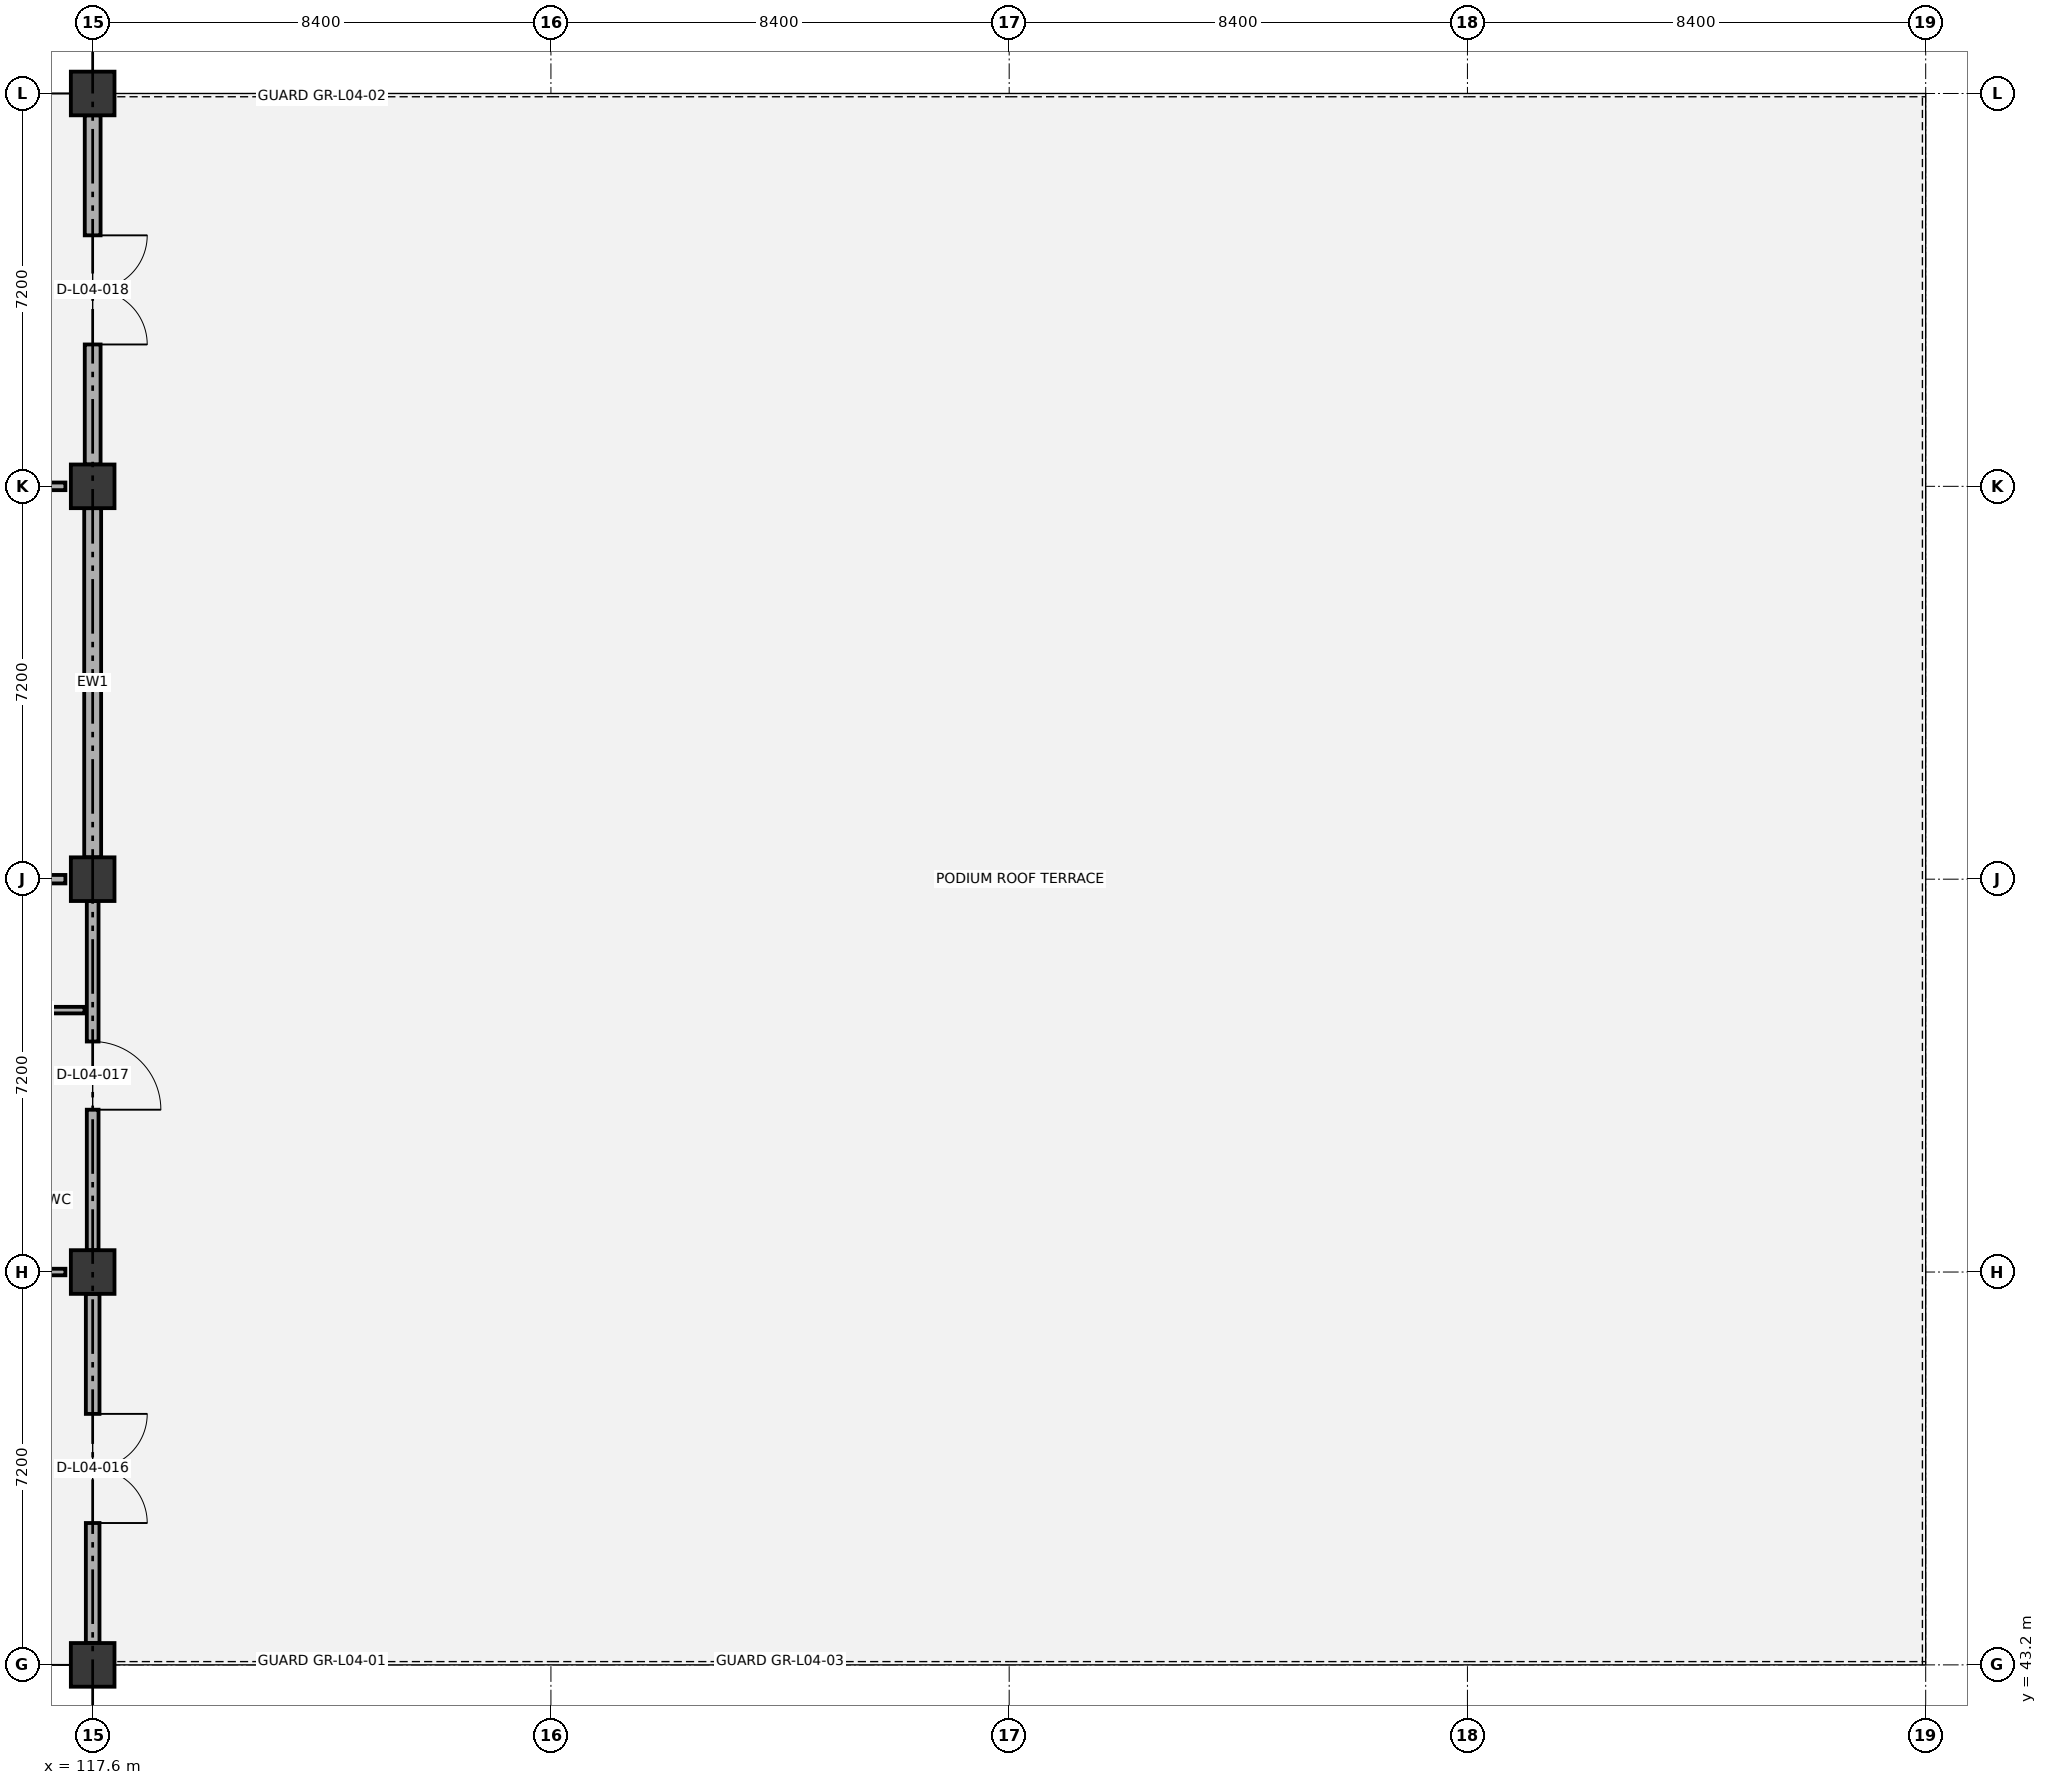
"""IFC4 building model, lengths in metres.
Left out: names, types, materials, properties, quantities, classifications, styles, units other than length and angle.
Written with IfcOpenShell. Run it as: python <this file> out.ifc"""

import sys

from ifc_helpers import new_model, si_unit, direction, frame, frame_2d, origin, origin_2d, place, context, subcontext, project, spatial, rectangle, extrude, element, fill, save


model = new_model("IFC4")
c1 = context("Model", 3, precision=1e-05, world=origin(), true_north=direction((0.0, 1.0)))
c2 = subcontext(c1, "Body", "Model", "MODEL_VIEW")
j1 = project(units=[si_unit("LENGTHUNIT", "METRE"), si_unit("PLANEANGLEUNIT", "RADIAN")], contexts=[c1])
p1 = place(None, origin())
s1 = spatial("IfcSite", under=j1, at=p1, CompositionType="ELEMENT")
p2 = place(p1, origin())
s2 = spatial("IfcBuilding", under=s1, at=p2, CompositionType="ELEMENT")
p3 = place(p2, frame((0.0, 0.0, 22.2)))
s3 = spatial("IfcBuildingStorey", under=s2, at=p3, CompositionType="ELEMENT", Elevation=22.2)
for number, where, z_axis, x_axis in (
    (1, (117.6, 43.2, 0.0), (0.0, 0.0, 1.0), (1.0, 0.0, 0.0)),
    (2, (117.6, 50.4, 0.0), (0.0, 0.0, 1.0), (1.0, 0.0, 0.0)),
    (3, (117.6, 57.6, 0.0), (0.0, 0.0, 1.0), (1.0, 0.0, 0.0)),
    (4, (117.6, 64.8, 0.0), (0.0, 0.0, 1.0), (1.0, 0.0, 0.0)),
    (5, (117.6, 72.0, 0.0), (0.0, 0.0, 1.0), (1.0, 0.0, 0.0)),
):
    element("IfcColumn", number, at=place(p3, frame(where, z_axis=z_axis, x_axis=x_axis)), inside=s3, PredefinedType="COLUMN", context=c2, shape_type="SweptSolid", body=[
        extrude(rectangle(XDim=0.8, YDim=0.8, at=origin_2d()), origin(), (0.0, 0.0, 1.0), 4.8),
    ])
p4 = place(p3, frame((117.6, 43.6, 0.0), z_axis=(0.0, 0.0, 1.0), x_axis=(0.0, 1.0, 0.0)))
e6 = element("IfcWall", 6, at=p4, inside=s3, PredefinedType="SOLIDWALL", context=c2, shape_type="SweptSolid", body=[
    extrude(rectangle(XDim=6.4, YDim=0.25, at=frame_2d((3.2, 0.0))), origin(), (0.0, 0.0, 1.0), 3.865),
])
p5 = place(p4, frame((2.2, 0.0, 0.0)))
e7 = element("IfcOpeningElement", 7, at=p5, cuts=e6, PredefinedType="OPENING", context=c2, shape_type="SweptSolid", body=[
    extrude(rectangle(XDim=2.0, YDim=2.4, at=frame_2d((1.0, 1.2))), frame((0.0, 0.135, 0.0), z_axis=(0.0, -1.0, 0.0), x_axis=(1.0, 0.0, 0.0)), (0.0, 0.0, 1.0), 0.27),
])
p6 = place(p3, frame((117.6, 50.8, 0.0), z_axis=(0.0, 0.0, 1.0), x_axis=(0.0, 1.0, 0.0)))
e8 = element("IfcWall", 8, at=p6, inside=s3, PredefinedType="SOLIDWALL", context=c2, shape_type="SweptSolid", body=[
    extrude(rectangle(XDim=6.4, YDim=0.215, at=frame_2d((3.2, 0.0))), origin(), (0.0, 0.0, 1.0), 3.865),
])
p7 = place(p6, frame((2.575, 0.0, 0.0)))
e9 = element("IfcOpeningElement", 9, at=p7, cuts=e8, PredefinedType="OPENING", context=c2, shape_type="SweptSolid", body=[
    extrude(rectangle(XDim=1.25, YDim=2.15, at=frame_2d((0.625, 1.075))), frame((0.0, 0.117, 0.0), z_axis=(0.0, -1.0, 0.0), x_axis=(1.0, 0.0, 0.0)), (0.0, 0.0, 1.0), 0.235),
])
p8 = place(p3, frame((117.6, 58.0, 0.0), z_axis=(0.0, 0.0, 1.0), x_axis=(0.0, 1.0, 0.0)))
e10 = element("IfcWall", 10, at=p8, inside=s3, PredefinedType="SOLIDWALL", context=c2, shape_type="SweptSolid", body=[
    extrude(rectangle(XDim=6.4, YDim=0.31, at=frame_2d((3.2, 0.0))), origin(), (0.0, 0.0, 1.0), 3.865),
])
p9 = place(p3, frame((117.6, 65.2, 0.0), z_axis=(0.0, 0.0, 1.0), x_axis=(0.0, 1.0, 0.0)))
e11 = element("IfcWall", 11, at=p9, inside=s3, PredefinedType="SOLIDWALL", context=c2, shape_type="SweptSolid", body=[
    extrude(rectangle(XDim=6.4, YDim=0.29, at=frame_2d((3.2, 0.0))), origin(), (0.0, 0.0, 1.0), 3.865),
])
p10 = place(p9, frame((2.2, 0.0, 0.0)))
e12 = element("IfcOpeningElement", 12, at=p10, cuts=e11, PredefinedType="OPENING", context=c2, shape_type="SweptSolid", body=[
    extrude(rectangle(XDim=2.0, YDim=2.4, at=frame_2d((1.0, 1.2))), frame((0.0, 0.155, 0.0), z_axis=(0.0, -1.0, 0.0), x_axis=(1.0, 0.0, 0.0)), (0.0, 0.0, 1.0), 0.31),
])
for number, where, z_axis, x_axis in (
    (13, (117.6, 72.12, -0.35), (0.0, 0.0, 1.0), (0.0, 1.0, 0.0)),
    (14, (151.2, 72.12, -0.35), (0.0, 0.0, 1.0), (0.0, 1.0, 0.0)),
):
    element("IfcWall", number, at=place(p3, frame(where, z_axis=z_axis, x_axis=x_axis)), inside=s3, PredefinedType="PARAPET", context=c2, shape_type="SweptSolid", body=[
        extrude(rectangle(XDim=6.96, YDim=0.22, at=frame_2d((3.48, 0.0))), origin(), (0.0, 0.0, 1.0), 1.15),
    ])
p11 = place(p3, frame((109.35, 55.2, 0.0), z_axis=(0.0, 0.0, 1.0), x_axis=(1.0, 0.0, 0.0)))
e15 = element("IfcWall", 15, at=p11, inside=s3, PredefinedType="PARTITIONING", context=c2, shape_type="SweptSolid", body=[
    extrude(rectangle(XDim=8.1, YDim=0.12, at=frame_2d((4.05, 0.0))), origin(), (0.0, 0.0, 1.0), 4.52),
])
p12 = place(p11, frame((1.08, 0.0, 0.0)))
e16 = element("IfcOpeningElement", 16, at=p12, cuts=e15, PredefinedType="OPENING", context=c2, shape_type="SweptSolid", body=[
    extrude(rectangle(XDim=0.95, YDim=2.1, at=frame_2d((0.475, 1.05))), frame((0.0, 0.07, 0.0), z_axis=(0.0, -1.0, 0.0), x_axis=(1.0, 0.0, 0.0)), (0.0, 0.0, 1.0), 0.14),
])
p13 = place(p11, frame((3.63, 0.0, 0.0)))
e17 = element("IfcOpeningElement", 17, at=p13, cuts=e15, PredefinedType="OPENING", context=c2, shape_type="SweptSolid", body=[
    extrude(rectangle(XDim=0.9, YDim=2.1, at=frame_2d((0.45, 1.05))), frame((0.0, 0.07, 0.0), z_axis=(0.0, -1.0, 0.0), x_axis=(1.0, 0.0, 0.0)), (0.0, 0.0, 1.0), 0.14),
])
p14 = place(p11, frame((6.13, 0.0, 0.0)))
e18 = element("IfcOpeningElement", 18, at=p14, cuts=e15, PredefinedType="OPENING", context=c2, shape_type="SweptSolid", body=[
    extrude(rectangle(XDim=1.0, YDim=2.1, at=frame_2d((0.5, 1.05))), frame((0.0, 0.07, 0.0), z_axis=(0.0, -1.0, 0.0), x_axis=(1.0, 0.0, 0.0)), (0.0, 0.0, 1.0), 0.14),
])
p15 = place(p3, frame((109.7, 50.4, 0.0), z_axis=(0.0, 0.0, 1.0), x_axis=(1.0, 0.0, 0.0)))
e19 = element("IfcWall", 19, at=p15, inside=s3, PredefinedType="PARTITIONING", context=c2, shape_type="SweptSolid", body=[
    extrude(rectangle(XDim=7.4, YDim=0.12, at=frame_2d((3.7, 0.0))), origin(), (0.0, 0.0, 1.0), 3.815),
])
p16 = place(p3, frame((109.7, 57.6, 0.0), z_axis=(0.0, 0.0, 1.0), x_axis=(1.0, 0.0, 0.0)))
e20 = element("IfcWall", 20, at=p16, inside=s3, PredefinedType="PARTITIONING", context=c2, shape_type="SweptSolid", body=[
    extrude(rectangle(XDim=7.4, YDim=0.155, at=frame_2d((3.7, 0.0))), origin(), (0.0, 0.0, 1.0), 3.815),
])
p17 = place(p16, frame((2.85, 0.0, 0.0)))
e21 = element("IfcOpeningElement", 21, at=p17, cuts=e20, PredefinedType="OPENING", context=c2, shape_type="SweptSolid", body=[
    extrude(rectangle(XDim=1.7, YDim=2.25, at=frame_2d((0.85, 1.125))), frame((0.0, 0.087, 0.0), z_axis=(0.0, -1.0, 0.0), x_axis=(1.0, 0.0, 0.0)), (0.0, 0.0, 1.0), 0.175),
])
p18 = place(p3, frame((109.7, 64.8, 0.0), z_axis=(0.0, 0.0, 1.0), x_axis=(1.0, 0.0, 0.0)))
e22 = element("IfcWall", 22, at=p18, inside=s3, PredefinedType="PARTITIONING", context=c2, shape_type="SweptSolid", body=[
    extrude(rectangle(XDim=7.4, YDim=0.14, at=frame_2d((3.7, 0.0))), origin(), (0.0, 0.0, 1.0), 3.815),
])
p19 = place(p18, frame((3.0, 0.0, 0.0)))
e23 = element("IfcOpeningElement", 23, at=p19, cuts=e22, PredefinedType="OPENING", context=c2, shape_type="SweptSolid", body=[
    extrude(rectangle(XDim=1.4, YDim=2.15, at=frame_2d((0.7, 1.075))), frame((0.0, 0.08, 0.0), z_axis=(0.0, -1.0, 0.0), x_axis=(1.0, 0.0, 0.0)), (0.0, 0.0, 1.0), 0.16),
])
p20 = place(p5, frame((2.0, 0.0, 0.0), z_axis=(0.0, 0.0, 1.0), x_axis=(-1.0, 0.0, 0.0)))
e24 = element("IfcDoor", 24, at=p20, inside=s3, OperationType="DOUBLE_DOOR_SINGLE_SWING", PredefinedType="DOOR", context=c2, shape_type="SweptSolid", body=[
    extrude(rectangle(XDim=2.0, YDim=2.4, at=frame_2d((1.0, 1.2))), frame((0.0, 0.025, 0.0), z_axis=(0.0, -1.0, 0.0), x_axis=(1.0, 0.0, 0.0)), (0.0, 0.0, 1.0), 0.05),
])
fill(e7, e24)
p21 = place(p7, frame((1.25, 0.0, 0.0), z_axis=(0.0, 0.0, 1.0), x_axis=(-1.0, 0.0, 0.0)))
e25 = element("IfcDoor", 25, at=p21, inside=s3, OperationType="SINGLE_SWING_RIGHT", PredefinedType="DOOR", context=c2, shape_type="SweptSolid", body=[
    extrude(rectangle(XDim=1.25, YDim=2.15, at=frame_2d((0.625, 1.075))), frame((0.0, 0.025, 0.0), z_axis=(0.0, -1.0, 0.0), x_axis=(1.0, 0.0, 0.0)), (0.0, 0.0, 1.0), 0.05),
])
fill(e9, e25)
p22 = place(p10, frame((2.0, 0.0, 0.0), z_axis=(0.0, 0.0, 1.0), x_axis=(-1.0, 0.0, 0.0)))
e26 = element("IfcDoor", 26, at=p22, inside=s3, OperationType="DOUBLE_DOOR_SINGLE_SWING", PredefinedType="DOOR", context=c2, shape_type="SweptSolid", body=[
    extrude(rectangle(XDim=2.0, YDim=2.4, at=frame_2d((1.0, 1.2))), frame((0.0, 0.025, 0.0), z_axis=(0.0, -1.0, 0.0), x_axis=(1.0, 0.0, 0.0)), (0.0, 0.0, 1.0), 0.05),
])
fill(e12, e26)
save(model, sys.argv[1])
